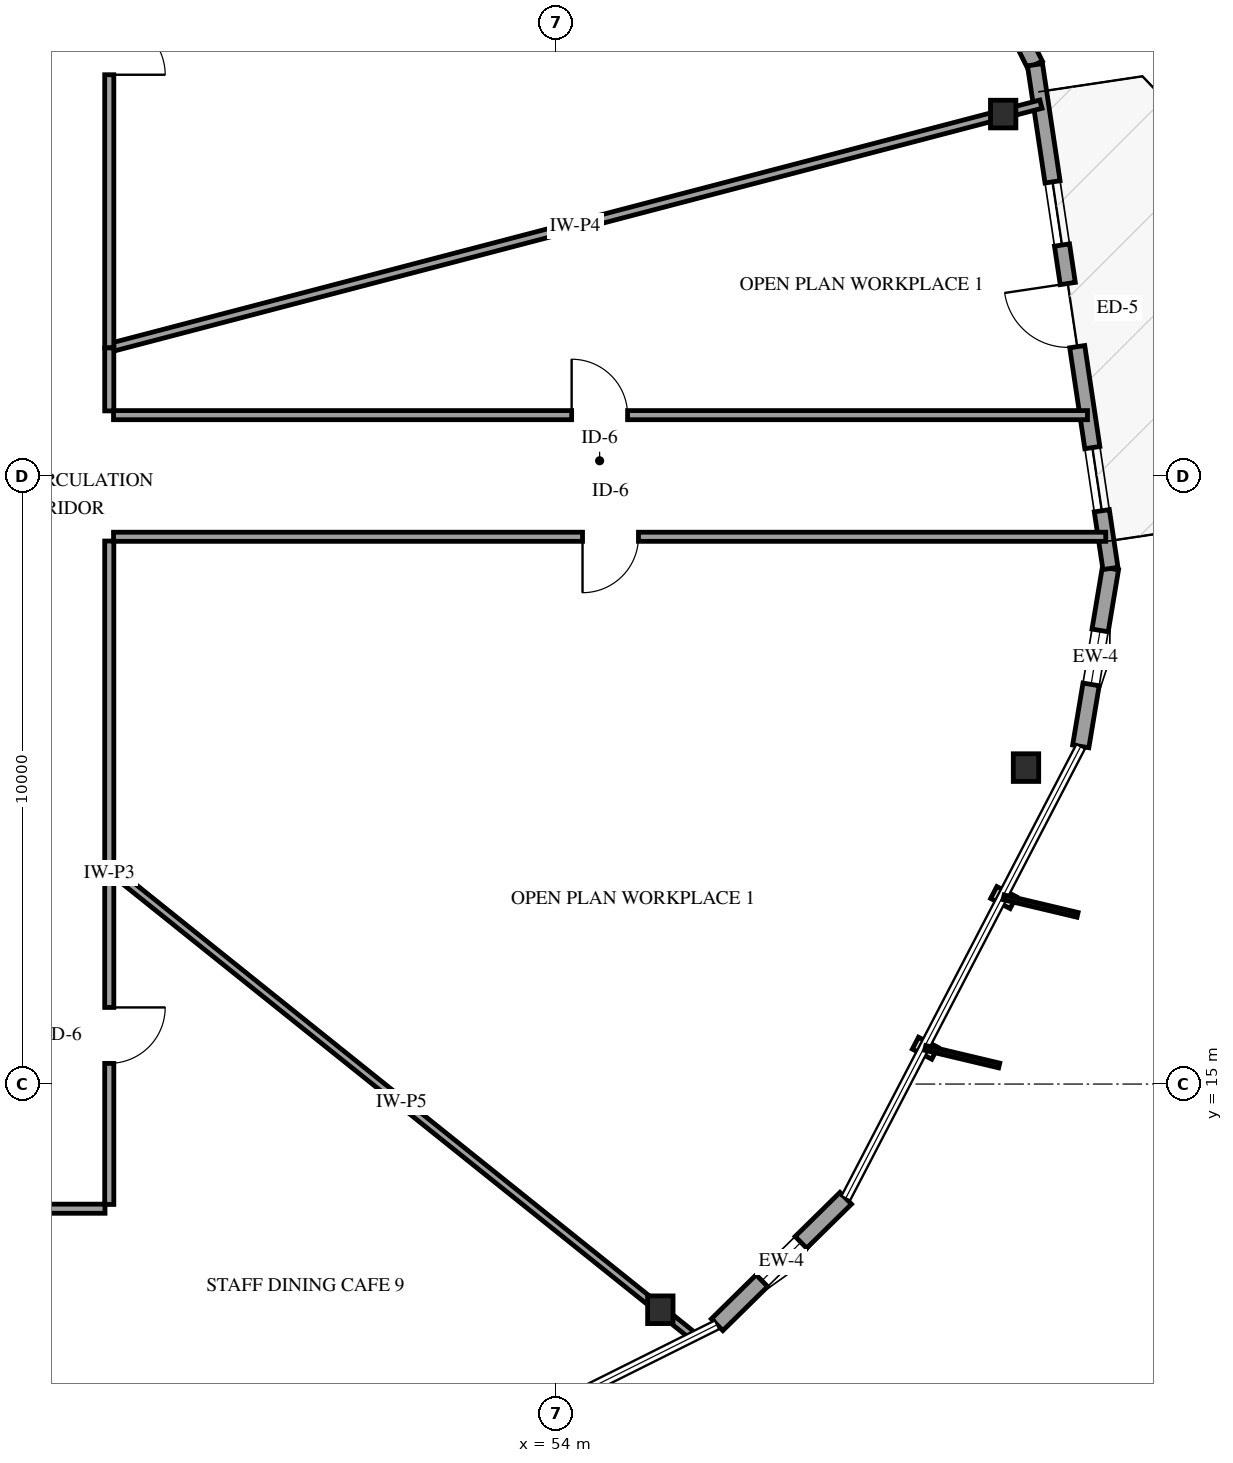
"""IFC4 building model, lengths in metres.
Left out: names, types, materials, properties, quantities, classifications, styles, units other than length and angle.
Written with IfcOpenShell. Run it as: python <this file> out.ifc"""

import sys

from ifc_helpers import new_model, si_unit, direction, frame, frame_2d, origin, origin_2d, place, context, subcontext, project, spatial, rectangle, i_section, extrude, element, fill, save


model = new_model("IFC4")
c1 = context("Model", 3, precision=1e-05, world=origin(), true_north=direction((0.0, 1.0)))
c2 = subcontext(c1, "Body", "Model", "MODEL_VIEW")
j1 = project(units=[si_unit("LENGTHUNIT", "METRE"), si_unit("PLANEANGLEUNIT", "RADIAN")], contexts=[c1])
p1 = place(None, origin())
s1 = spatial("IfcSite", under=j1, at=p1, CompositionType="ELEMENT")
p2 = place(p1, origin())
s2 = spatial("IfcBuilding", under=s1, at=p2, CompositionType="ELEMENT")
p3 = place(p2, frame((0.0, 0.0, 130.3)))
s3 = spatial("IfcBuildingStorey", under=s2, at=p3, CompositionType="ELEMENT", Elevation=130.3)
for number, where, z_axis, x_axis in (
    (1, (61.351, 30.951, 0.0), (0.0, 0.0, 1.0), (1.0, 0.0, 0.0)),
    (2, (55.712, 11.289, 0.0), (0.0, 0.0, 1.0), (1.0, 0.0, 0.0)),
    (3, (61.726, 20.204, 0.0), (0.0, 0.0, 1.0), (1.0, 0.0, 0.0)),
):
    element("IfcColumn", number, at=place(p3, frame(where, z_axis=z_axis, x_axis=x_axis)), inside=s3, PredefinedType="COLUMN", context=c2, shape_type="SweptSolid", body=[
        extrude(i_section(OverallWidth=0.418, OverallDepth=0.455, WebThickness=0.042, FlangeThickness=0.068, FilletRadius=0.038, at=origin_2d()), origin(), (0.0, 0.0, 1.0), 3.9),
    ])
p4 = place(p3, frame((56.646, 11.042, 0.0), z_axis=(0.0, 0.0, 1.0), x_axis=(0.713048365922, 0.701114846409, 0.0)))
e4 = element("IfcWall", 4, at=p4, inside=s3, PredefinedType="SOLIDWALL", context=c2, shape_type="SweptSolid", body=[
    extrude(rectangle(XDim=2.967, YDim=0.27, at=frame_2d((1.483, 0.0))), origin(), (0.0, 0.0, 1.0), 2.939),
])
p5 = place(p4, frame((1.033, 0.0, 0.75)))
e5 = element("IfcOpeningElement", 5, at=p5, cuts=e4, PredefinedType="OPENING", context=c2, shape_type="SweptSolid", body=[
    extrude(rectangle(XDim=0.9, YDim=1.5, at=frame_2d((0.45, 0.75))), frame((0.0, 0.145, 0.0), z_axis=(0.0, -1.0, 0.0), x_axis=(1.0, 0.0, 0.0)), (0.0, 0.0, 1.0), 0.29),
])
p6 = place(p3, frame((62.626, 20.553, 0.0), z_axis=(0.0, 0.0, 1.0), x_axis=(0.164759305297, 0.986333803191, 0.0)))
e6 = element("IfcWall", 6, at=p6, inside=s3, PredefinedType="SOLIDWALL", context=c2, shape_type="SweptSolid", body=[
    extrude(rectangle(XDim=2.967, YDim=0.27, at=frame_2d((1.483, 0.0))), origin(), (0.0, 0.0, 1.0), 2.939),
])
p7 = place(p6, frame((1.033, 0.0, 0.75)))
e7 = element("IfcOpeningElement", 7, at=p7, cuts=e6, PredefinedType="OPENING", context=c2, shape_type="SweptSolid", body=[
    extrude(rectangle(XDim=0.9, YDim=1.5, at=frame_2d((0.45, 0.75))), frame((0.0, 0.145, 0.0), z_axis=(0.0, -1.0, 0.0), x_axis=(1.0, 0.0, 0.0)), (0.0, 0.0, 1.0), 0.29),
])
p8 = place(p3, frame((61.874, 31.763, 0.0), z_axis=(0.0, 0.0, 1.0), x_axis=(-0.446489189921, 0.894789027248, 0.0)))
e8 = element("IfcWall", 8, at=p8, inside=s3, PredefinedType="SOLIDWALL", context=c2, shape_type="SweptSolid", body=[
    extrude(rectangle(XDim=2.966, YDim=0.27, at=frame_2d((1.483, 0.0))), origin(), (0.0, 0.0, 1.0), 2.939),
])
p9 = place(p8, frame((1.033, 0.0, 0.75)))
e9 = element("IfcOpeningElement", 9, at=p9, cuts=e8, PredefinedType="OPENING", context=c2, shape_type="SweptSolid", body=[
    extrude(rectangle(XDim=0.9, YDim=1.5, at=frame_2d((0.45, 0.75))), frame((0.0, 0.145, 0.0), z_axis=(0.0, -1.0, 0.0), x_axis=(1.0, 0.0, 0.0)), (0.0, 0.0, 1.0), 0.29),
])
p10 = place(p3, frame((63.115, 23.479, 0.0), z_axis=(0.0, 0.0, 1.0), x_axis=(-0.148183669797, 0.988959857631, 0.0)))
e10 = element("IfcWall", 10, at=p10, inside=s3, PredefinedType="SOLIDWALL", context=c2, shape_type="SweptSolid", body=[
    extrude(rectangle(XDim=8.376, YDim=0.25, at=frame_2d((4.188, 0.0))), origin(), (0.0, 0.0, 1.0), 2.939),
])
p11 = place(p10, frame((3.688, 0.0, 0.0)))
e11 = element("IfcOpeningElement", 11, at=p11, cuts=e10, PredefinedType="OPENING", context=c2, shape_type="SweptSolid", body=[
    extrude(rectangle(XDim=1.05, YDim=2.15, at=frame_2d((0.525, 1.075))), frame((0.0, 0.135, 0.0), z_axis=(0.0, -1.0, 0.0), x_axis=(1.0, 0.0, 0.0)), (0.0, 0.0, 1.0), 0.27),
])
p12 = place(p10, frame((0.959, 0.0, 0.72)))
e12 = element("IfcOpeningElement", 12, at=p12, cuts=e10, PredefinedType="OPENING", context=c2, shape_type="SweptSolid", body=[
    extrude(rectangle(XDim=1.05, YDim=1.55, at=frame_2d((0.525, 0.775))), frame((0.0, 0.135, 0.0), z_axis=(0.0, -1.0, 0.0), x_axis=(1.0, 0.0, 0.0)), (0.0, 0.0, 1.0), 0.27),
])
p13 = place(p10, frame((5.378, 0.0, 0.72)))
e13 = element("IfcOpeningElement", 13, at=p13, cuts=e10, PredefinedType="OPENING", context=c2, shape_type="SweptSolid", body=[
    extrude(rectangle(XDim=1.05, YDim=1.55, at=frame_2d((0.525, 0.775))), frame((0.0, 0.135, 0.0), z_axis=(0.0, -1.0, 0.0), x_axis=(1.0, 0.0, 0.0)), (0.0, 0.0, 1.0), 0.27),
])
p14 = place(p3, frame((63.037, 24.0, 0.0), z_axis=(0.0, 0.0, 1.0), x_axis=(-1.0, 0.0, 0.0)))
e14 = element("IfcWall", 14, at=p14, inside=s3, PredefinedType="PARTITIONING", context=c2, shape_type="SweptSolid", body=[
    extrude(rectangle(XDim=16.317, YDim=0.15, at=frame_2d((8.159, 0.0))), origin(), (0.0, 0.0, 1.0), 3.56),
])
p15 = place(p14, frame((7.684, 0.0, 0.0)))
e15 = element("IfcOpeningElement", 15, at=p15, cuts=e14, PredefinedType="OPENING", context=c2, shape_type="SweptSolid", body=[
    extrude(rectangle(XDim=0.92, YDim=2.12, at=frame_2d((0.46, 1.06))), frame((0.0, 0.085, 0.0), z_axis=(0.0, -1.0, 0.0), x_axis=(1.0, 0.0, 0.0)), (0.0, 0.0, 1.0), 0.17),
])
p16 = place(p3, frame((46.72, 26.0, 0.0), z_axis=(0.0, 0.0, 1.0), x_axis=(1.0, 0.0, 0.0)))
e16 = element("IfcWall", 16, at=p16, inside=s3, PredefinedType="PARTITIONING", context=c2, shape_type="SweptSolid", body=[
    extrude(rectangle(XDim=16.017, YDim=0.15, at=frame_2d((8.009, 0.0))), origin(), (0.0, 0.0, 1.0), 3.56),
])
p17 = place(p16, frame((7.534, 0.0, 0.0)))
e17 = element("IfcOpeningElement", 17, at=p17, cuts=e16, PredefinedType="OPENING", context=c2, shape_type="SweptSolid", body=[
    extrude(rectangle(XDim=0.92, YDim=2.12, at=frame_2d((0.46, 1.06))), frame((0.0, 0.085, 0.0), z_axis=(0.0, -1.0, 0.0), x_axis=(1.0, 0.0, 0.0)), (0.0, 0.0, 1.0), 0.17),
])
p18 = place(p3, frame((46.65, 27.106, 0.0), z_axis=(0.0, 0.0, 1.0), x_axis=(0.967443345074, 0.2530876806, 0.0)))
e18 = element("IfcWall", 18, at=p18, inside=s3, PredefinedType="PARTITIONING", context=c2, shape_type="SweptSolid", body=[
    extrude(rectangle(XDim=15.837, YDim=0.14, at=frame_2d((7.918, 0.0))), origin(), (0.0, 0.0, 1.0), 2.855),
])
p19 = place(p3, frame((46.65, 18.55, 0.0), z_axis=(0.0, 0.0, 1.0), x_axis=(0.78035987764, -0.625330681615, 0.0)))
e19 = element("IfcWall", 19, at=p19, inside=s3, PredefinedType="PARTITIONING", context=c2, shape_type="SweptSolid", body=[
    extrude(rectangle(XDim=12.315, YDim=0.13, at=frame_2d((6.157, 0.0))), origin(), (0.0, 0.0, 1.0), 3.56),
])
p20 = place(p3, frame((46.65, 36.98, 0.0), z_axis=(0.0, 0.0, 1.0), x_axis=(0.0, -1.0, 0.0)))
e20 = element("IfcWall", 20, at=p20, inside=s3, PredefinedType="PARTITIONING", context=c2, shape_type="SweptSolid", body=[
    extrude(rectangle(XDim=9.874, YDim=0.15, at=frame_2d((4.937, 0.0))), origin(), (0.0, 0.0, 1.0), 3.56),
])
p21 = place(p20, frame((4.462, 0.0, 0.0)))
e21 = element("IfcOpeningElement", 21, at=p21, cuts=e20, PredefinedType="OPENING", context=c2, shape_type="SweptSolid", body=[
    extrude(rectangle(XDim=0.92, YDim=2.12, at=frame_2d((0.46, 1.06))), frame((0.0, 0.085, 0.0), z_axis=(0.0, -1.0, 0.0), x_axis=(1.0, 0.0, 0.0)), (0.0, 0.0, 1.0), 0.17),
])
p22 = place(p3, frame((43.455, 12.95, 0.0), z_axis=(0.0, 0.0, 1.0), x_axis=(0.373867836137, -0.927481989638, 0.0)))
e22 = element("IfcWall", 22, at=p22, inside=s3, PredefinedType="PARTITIONING", context=c2, shape_type="SweptSolid", body=[
    extrude(rectangle(XDim=6.505, YDim=0.14, at=frame_2d((3.252, 0.0))), origin(), (0.0, 0.0, 1.0), 2.855),
])
p23 = place(p3, frame((46.65, 18.55, 0.0), z_axis=(0.0, 0.0, 1.0), x_axis=(0.0, -1.0, 0.0)))
e23 = element("IfcWall", 23, at=p23, inside=s3, PredefinedType="PARTITIONING", context=c2, shape_type="SweptSolid", body=[
    extrude(rectangle(XDim=5.53, YDim=0.15, at=frame_2d((2.765, 0.0))), origin(), (0.0, 0.0, 1.0), 3.56),
])
p24 = place(p23, frame((2.29, 0.0, 0.0)))
e24 = element("IfcOpeningElement", 24, at=p24, cuts=e23, PredefinedType="OPENING", context=c2, shape_type="SweptSolid", body=[
    extrude(rectangle(XDim=0.92, YDim=2.12, at=frame_2d((0.46, 1.06))), frame((0.0, 0.085, 0.0), z_axis=(0.0, -1.0, 0.0), x_axis=(1.0, 0.0, 0.0)), (0.0, 0.0, 1.0), 0.17),
])
p25 = place(p3, frame((46.65, 23.93, 0.0), z_axis=(0.0, 0.0, 1.0), x_axis=(0.0, -1.0, 0.0)))
e25 = element("IfcWall", 25, at=p25, inside=s3, PredefinedType="PARTITIONING", context=c2, shape_type="SweptSolid", body=[
    extrude(rectangle(XDim=5.38, YDim=0.15, at=frame_2d((2.69, 0.0))), origin(), (0.0, 0.0, 1.0), 3.56),
])
p26 = place(p3, frame((46.58, 12.95, 0.0), z_axis=(0.0, 0.0, 1.0), x_axis=(-1.0, 0.0, 0.0)))
e26 = element("IfcWall", 26, at=p26, inside=s3, PredefinedType="PARTITIONING", context=c2, shape_type="SweptSolid", body=[
    extrude(rectangle(XDim=3.125, YDim=0.15, at=frame_2d((1.562, 0.0))), origin(), (0.0, 0.0, 1.0), 3.56),
])
p27 = place(p3, frame((46.65, 27.106, 0.0), z_axis=(0.0, 0.0, 1.0), x_axis=(0.0, -1.0, 0.0)))
e27 = element("IfcWall", 27, at=p27, inside=s3, PredefinedType="PARTITIONING", context=c2, shape_type="SweptSolid", body=[
    extrude(rectangle(XDim=1.036, YDim=0.15, at=frame_2d((0.518, 0.0))), origin(), (0.0, 0.0, 1.0), 3.56),
])
p28 = place(p5, origin())
e28 = element("IfcWindow", 28, at=p28, inside=s3, PartitioningType="SINGLE_PANEL", PredefinedType="WINDOW", context=c2, shape_type="SweptSolid", body=[
    extrude(rectangle(XDim=0.9, YDim=1.5, at=frame_2d((0.45, 0.75))), frame((0.0, 0.03, 0.0), z_axis=(0.0, -1.0, 0.0), x_axis=(1.0, 0.0, 0.0)), (0.0, 0.0, 1.0), 0.06),
])
fill(e5, e28)
p29 = place(p7, origin())
e29 = element("IfcWindow", 29, at=p29, inside=s3, PartitioningType="SINGLE_PANEL", PredefinedType="WINDOW", context=c2, shape_type="SweptSolid", body=[
    extrude(rectangle(XDim=0.9, YDim=1.5, at=frame_2d((0.45, 0.75))), frame((0.0, 0.03, 0.0), z_axis=(0.0, -1.0, 0.0), x_axis=(1.0, 0.0, 0.0)), (0.0, 0.0, 1.0), 0.06),
])
fill(e7, e29)
p30 = place(p11, origin())
e30 = element("IfcDoor", 30, at=p30, inside=s3, OperationType="SINGLE_SWING_RIGHT", PredefinedType="DOOR", context=c2, shape_type="SweptSolid", body=[
    extrude(rectangle(XDim=1.05, YDim=2.15, at=frame_2d((0.525, 1.075))), frame((0.0, 0.025, 0.0), z_axis=(0.0, -1.0, 0.0), x_axis=(1.0, 0.0, 0.0)), (0.0, 0.0, 1.0), 0.05),
])
fill(e11, e30)
p31 = place(p12, origin())
e31 = element("IfcWindow", 31, at=p31, inside=s3, PartitioningType="SINGLE_PANEL", PredefinedType="WINDOW", context=c2, shape_type="SweptSolid", body=[
    extrude(rectangle(XDim=1.05, YDim=1.55, at=frame_2d((0.525, 0.775))), frame((0.0, 0.03, 0.0), z_axis=(0.0, -1.0, 0.0), x_axis=(1.0, 0.0, 0.0)), (0.0, 0.0, 1.0), 0.06),
])
fill(e12, e31)
p32 = place(p13, origin())
e32 = element("IfcWindow", 32, at=p32, inside=s3, PartitioningType="SINGLE_PANEL", PredefinedType="WINDOW", context=c2, shape_type="SweptSolid", body=[
    extrude(rectangle(XDim=1.05, YDim=1.55, at=frame_2d((0.525, 0.775))), frame((0.0, 0.03, 0.0), z_axis=(0.0, -1.0, 0.0), x_axis=(1.0, 0.0, 0.0)), (0.0, 0.0, 1.0), 0.06),
])
fill(e13, e32)
p33 = place(p15, origin())
e33 = element("IfcDoor", 33, at=p33, inside=s3, OperationType="SINGLE_SWING_RIGHT", PredefinedType="DOOR", context=c2, shape_type="SweptSolid", body=[
    extrude(rectangle(XDim=0.92, YDim=2.12, at=frame_2d((0.46, 1.06))), frame((0.0, 0.025, 0.0), z_axis=(0.0, -1.0, 0.0), x_axis=(1.0, 0.0, 0.0)), (0.0, 0.0, 1.0), 0.05),
])
fill(e15, e33)
p34 = place(p17, origin())
e34 = element("IfcDoor", 34, at=p34, inside=s3, OperationType="SINGLE_SWING_LEFT", PredefinedType="DOOR", context=c2, shape_type="SweptSolid", body=[
    extrude(rectangle(XDim=0.92, YDim=2.12, at=frame_2d((0.46, 1.06))), frame((0.0, 0.025, 0.0), z_axis=(0.0, -1.0, 0.0), x_axis=(1.0, 0.0, 0.0)), (0.0, 0.0, 1.0), 0.05),
])
fill(e17, e34)
p35 = place(p21, origin())
e35 = element("IfcDoor", 35, at=p35, inside=s3, OperationType="SINGLE_SWING_RIGHT", PredefinedType="DOOR", context=c2, shape_type="SweptSolid", body=[
    extrude(rectangle(XDim=0.92, YDim=2.12, at=frame_2d((0.46, 1.06))), frame((0.0, 0.025, 0.0), z_axis=(0.0, -1.0, 0.0), x_axis=(1.0, 0.0, 0.0)), (0.0, 0.0, 1.0), 0.05),
])
fill(e21, e35)
p36 = place(p24, origin())
e36 = element("IfcDoor", 36, at=p36, inside=s3, OperationType="SINGLE_SWING_LEFT", PredefinedType="DOOR", context=c2, shape_type="SweptSolid", body=[
    extrude(rectangle(XDim=0.92, YDim=2.12, at=frame_2d((0.46, 1.06))), frame((0.0, 0.025, 0.0), z_axis=(0.0, -1.0, 0.0), x_axis=(1.0, 0.0, 0.0)), (0.0, 0.0, 1.0), 0.05),
])
fill(e24, e36)
save(model, sys.argv[1])
